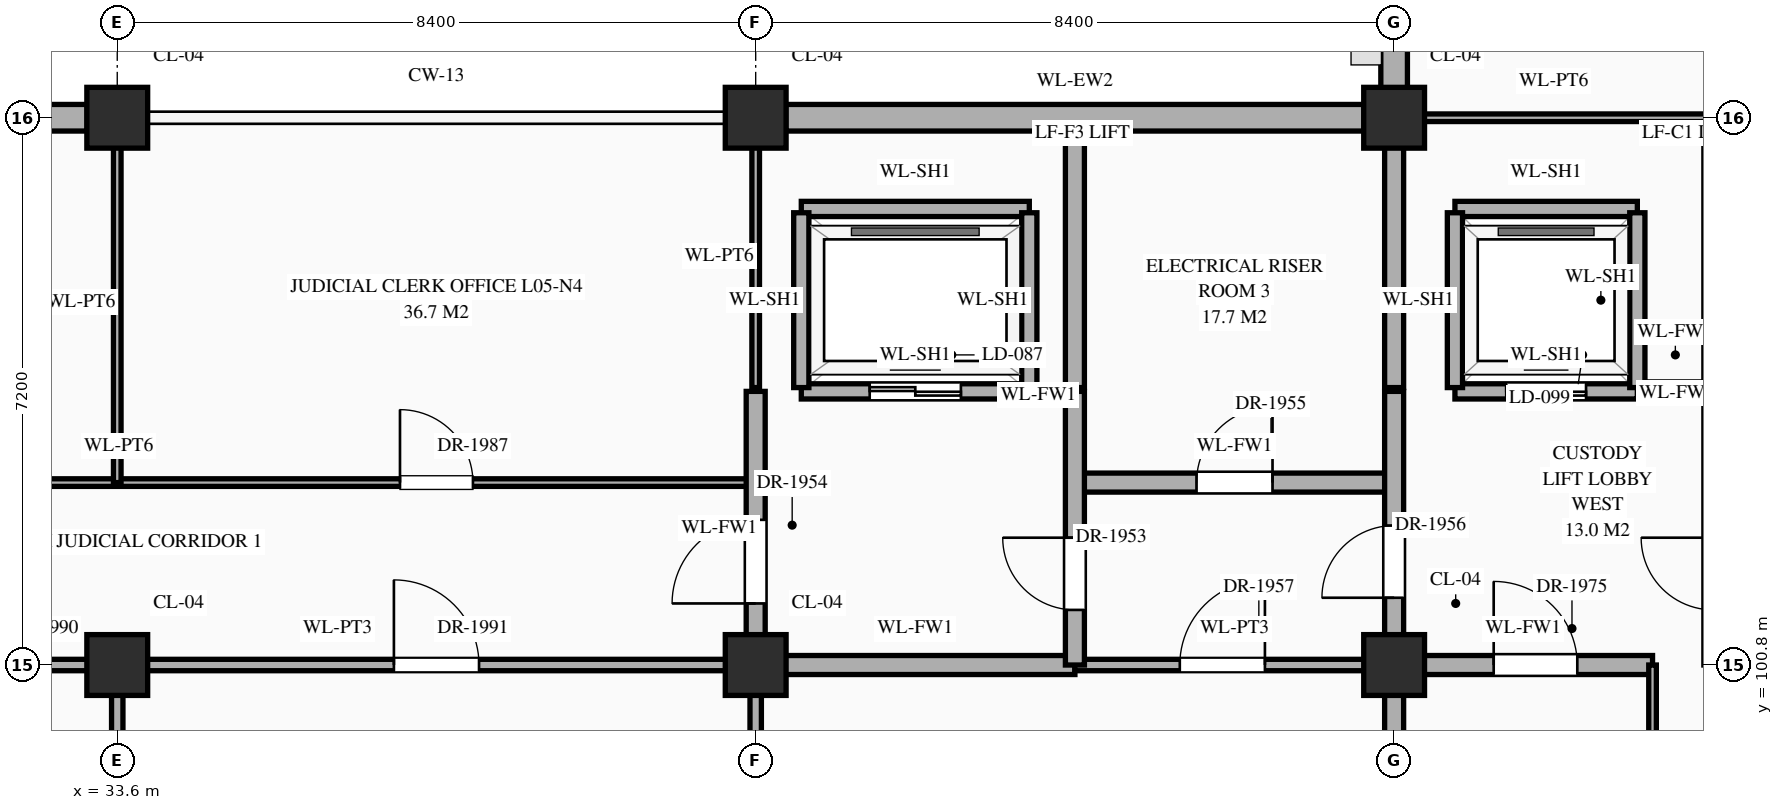
"""IFC4 building model, lengths in metres.
Left out: names, types, materials, properties, quantities, classifications, styles, units other than length and angle.
Written with IfcOpenShell. Run it as: python <this file> out.ifc"""

import sys

from ifc_helpers import new_model, si_unit, direction, frame, frame_2d, origin, origin_2d, place, context, subcontext, project, spatial, rectangle, extrude, element, fill, save


model = new_model("IFC4")
c1 = context("Model", 3, precision=1e-05, world=origin(), true_north=direction((0.0, 1.0)))
c2 = subcontext(c1, "Body", "Model", "MODEL_VIEW")
j1 = project(units=[si_unit("LENGTHUNIT", "METRE"), si_unit("PLANEANGLEUNIT", "RADIAN")], contexts=[c1])
p1 = place(None, origin())
s1 = spatial("IfcSite", under=j1, at=p1, CompositionType="ELEMENT")
p2 = place(p1, origin())
s2 = spatial("IfcBuilding", under=s1, at=p2, CompositionType="ELEMENT")
p3 = place(p2, frame((0.0, 0.0, 21.6)))
s3 = spatial("IfcBuildingStorey", under=s2, at=p3, CompositionType="ELEMENT", Elevation=21.6)
for number, where, z_axis, x_axis in (
    (1, (33.6, 100.8, 0.0), (0.0, 0.0, 1.0), (1.0, 0.0, 0.0)),
    (2, (33.6, 108.0, 0.0), (0.0, 0.0, 1.0), (1.0, 0.0, 0.0)),
    (3, (42.0, 100.8, 0.0), (0.0, 0.0, 1.0), (1.0, 0.0, 0.0)),
    (4, (42.0, 108.0, 0.0), (0.0, 0.0, 1.0), (1.0, 0.0, 0.0)),
    (5, (50.4, 100.8, 0.0), (0.0, 0.0, 1.0), (1.0, 0.0, 0.0)),
    (6, (50.4, 108.0, 0.0), (0.0, 0.0, 1.0), (1.0, 0.0, 0.0)),
):
    element("IfcColumn", number, at=place(p3, frame(where, z_axis=z_axis, x_axis=x_axis)), inside=s3, PredefinedType="COLUMN", context=c2, shape_type="SweptSolid", body=[
        extrude(rectangle(XDim=0.8, YDim=0.8, at=origin_2d()), origin(), (0.0, 0.0, 1.0), 4.5),
    ])
p4 = place(p3, frame((25.595, 108.0, 0.0), z_axis=(0.0, 0.0, 1.0), x_axis=(1.0, 0.0, 0.0)))
e7 = element("IfcWall", 7, at=p4, inside=s3, PredefinedType="STANDARD", context=c2, shape_type="SweptSolid", body=[
    extrude(rectangle(XDim=7.61, YDim=0.35, at=frame_2d((3.805, 0.0))), origin(), (0.0, 0.0, 1.0), 3.59),
])
p5 = place(p4, frame((5.205, 0.0, 0.85)))
e8 = element("IfcOpeningElement", 8, at=p5, cuts=e7, PredefinedType="OPENING", context=c2, shape_type="SweptSolid", body=[
    extrude(rectangle(XDim=1.2, YDim=1.92, at=frame_2d((0.6, 0.96))), frame((0.0, 0.187, 0.0), z_axis=(0.0, -1.0, 0.0), x_axis=(1.0, 0.0, 0.0)), (0.0, 0.0, 1.0), 0.374),
])
p6 = place(p3, frame((42.395, 108.0, 0.0), z_axis=(0.0, 0.0, 1.0), x_axis=(1.0, 0.0, 0.0)))
e9 = element("IfcWall", 9, at=p6, inside=s3, PredefinedType="STANDARD", context=c2, shape_type="SweptSolid", body=[
    extrude(rectangle(XDim=7.61, YDim=0.35, at=frame_2d((3.805, 0.0))), origin(), (0.0, 0.0, 1.0), 3.59),
])
p7 = place(p3, frame((50.4, 108.395, 0.0), z_axis=(0.0, 0.0, 1.0), x_axis=(0.0, 1.0, 0.0)))
e10 = element("IfcWall", 10, at=p7, inside=s3, PredefinedType="STANDARD", context=c2, shape_type="SweptSolid", body=[
    extrude(rectangle(XDim=6.41, YDim=0.35, at=frame_2d((3.205, 0.0))), origin(), (0.0, 0.0, 1.0), 3.59),
])
p8 = place(p7, frame((3.83, 0.0, 0.85)))
e11 = element("IfcOpeningElement", 11, at=p8, cuts=e10, PredefinedType="OPENING", context=c2, shape_type="SweptSolid", body=[
    extrude(rectangle(XDim=1.35, YDim=1.56, at=frame_2d((0.675, 0.78))), frame((0.0, 0.187, 0.0), z_axis=(0.0, -1.0, 0.0), x_axis=(1.0, 0.0, 0.0)), (0.0, 0.0, 1.0), 0.374),
])
p9 = place(p3, frame((31.0, 100.8, 0.0), z_axis=(0.0, 0.0, 1.0), x_axis=(1.0, 0.0, 0.0)))
e12 = element("IfcWall", 12, at=p9, inside=s3, PredefinedType="STANDARD", context=c2, shape_type="SweptSolid", body=[
    extrude(rectangle(XDim=11.0, YDim=0.15, at=frame_2d((5.5, 0.0))), origin(), (0.0, 0.0, 1.0), 3.39),
])
p10 = place(p9, frame((0.6, 0.0, 0.0)))
e13 = element("IfcOpeningElement", 13, at=p10, cuts=e12, PredefinedType="OPENING", context=c2, shape_type="SweptSolid", body=[
    extrude(rectangle(XDim=1.08, YDim=2.25, at=frame_2d((0.54, 1.125))), frame((0.0, 0.087, 0.0), z_axis=(0.0, -1.0, 0.0), x_axis=(1.0, 0.0, 0.0)), (0.0, 0.0, 1.0), 0.174),
])
p11 = place(p9, frame((6.24, 0.0, 0.0)))
e14 = element("IfcOpeningElement", 14, at=p11, cuts=e12, PredefinedType="OPENING", context=c2, shape_type="SweptSolid", body=[
    extrude(rectangle(XDim=1.12, YDim=2.25, at=frame_2d((0.56, 1.125))), frame((0.0, 0.087, 0.0), z_axis=(0.0, -1.0, 0.0), x_axis=(1.0, 0.0, 0.0)), (0.0, 0.0, 1.0), 0.174),
])
p12 = place(p3, frame((42.0, 100.8, 0.0), z_axis=(0.0, 0.0, 1.0), x_axis=(1.0, 0.0, 0.0)))
e15 = element("IfcWall", 15, at=p12, inside=s3, PredefinedType="STANDARD", context=c2, shape_type="SweptSolid", body=[
    extrude(rectangle(XDim=4.2, YDim=0.25, at=frame_2d((2.1, 0.0))), origin(), (0.0, 0.0, 1.0), 3.39),
])
p13 = place(p3, frame((46.2, 100.8, 0.0), z_axis=(0.0, 0.0, 1.0), x_axis=(1.0, 0.0, 0.0)))
e16 = element("IfcWall", 16, at=p13, inside=s3, PredefinedType="STANDARD", context=c2, shape_type="SweptSolid", body=[
    extrude(rectangle(XDim=4.2, YDim=0.15, at=frame_2d((2.1, 0.0))), origin(), (0.0, 0.0, 1.0), 3.39),
])
p14 = place(p13, frame((1.38, 0.0, 0.0)))
e17 = element("IfcOpeningElement", 17, at=p14, cuts=e16, PredefinedType="OPENING", context=c2, shape_type="SweptSolid", body=[
    extrude(rectangle(XDim=1.12, YDim=2.25, at=frame_2d((0.56, 1.125))), frame((0.0, 0.087, 0.0), z_axis=(0.0, -1.0, 0.0), x_axis=(1.0, 0.0, 0.0)), (0.0, 0.0, 1.0), 0.174),
])
p15 = place(p3, frame((50.4, 100.8, 0.0), z_axis=(0.0, 0.0, 1.0), x_axis=(1.0, 0.0, 0.0)))
e18 = element("IfcWall", 18, at=p15, inside=s3, PredefinedType="STANDARD", context=c2, shape_type="SweptSolid", body=[
    extrude(rectangle(XDim=3.4, YDim=0.25, at=frame_2d((1.7, 0.0))), origin(), (0.0, 0.0, 1.0), 3.39),
])
p16 = place(p15, frame((1.31, 0.0, 0.0)))
e19 = element("IfcOpeningElement", 19, at=p16, cuts=e18, PredefinedType="OPENING", context=c2, shape_type="SweptSolid", body=[
    extrude(rectangle(XDim=1.1, YDim=2.2, at=frame_2d((0.55, 1.1))), frame((0.0, 0.137, 0.0), z_axis=(0.0, -1.0, 0.0), x_axis=(1.0, 0.0, 0.0)), (0.0, 0.0, 1.0), 0.274),
])
p17 = place(p3, frame((25.24, 103.2, 0.0), z_axis=(0.0, 0.0, 1.0), x_axis=(1.0, 0.0, 0.0)))
e20 = element("IfcWall", 20, at=p17, inside=s3, PredefinedType="STANDARD", context=c2, shape_type="SweptSolid", body=[
    extrude(rectangle(XDim=16.76, YDim=0.1, at=frame_2d((8.38, 0.0))), origin(), (0.0, 0.0, 1.0), 4.24),
])
p18 = place(p17, frame((3.72, 0.0, 0.0)))
e21 = element("IfcOpeningElement", 21, at=p18, cuts=e20, PredefinedType="OPENING", context=c2, shape_type="SweptSolid", body=[
    extrude(rectangle(XDim=0.92, YDim=2.15, at=frame_2d((0.46, 1.075))), frame((0.0, 0.062, 0.0), z_axis=(0.0, -1.0, 0.0), x_axis=(1.0, 0.0, 0.0)), (0.0, 0.0, 1.0), 0.124),
])
p19 = place(p17, frame((12.08, 0.0, 0.0)))
e22 = element("IfcOpeningElement", 22, at=p19, cuts=e20, PredefinedType="OPENING", context=c2, shape_type="SweptSolid", body=[
    extrude(rectangle(XDim=0.96, YDim=2.2, at=frame_2d((0.48, 1.1))), frame((0.0, 0.062, 0.0), z_axis=(0.0, -1.0, 0.0), x_axis=(1.0, 0.0, 0.0)), (0.0, 0.0, 1.0), 0.124),
])
p20 = place(p3, frame((46.2, 103.2, 0.0), z_axis=(0.0, 0.0, 1.0), x_axis=(1.0, 0.0, 0.0)))
e23 = element("IfcWall", 23, at=p20, inside=s3, PredefinedType="STANDARD", context=c2, shape_type="SweptSolid", body=[
    extrude(rectangle(XDim=4.2, YDim=0.25, at=frame_2d((2.1, 0.0))), origin(), (0.0, 0.0, 1.0), 4.24),
])
p21 = place(p20, frame((1.6, 0.0, 0.0)))
e24 = element("IfcOpeningElement", 24, at=p21, cuts=e23, PredefinedType="OPENING", context=c2, shape_type="SweptSolid", body=[
    extrude(rectangle(XDim=1.0, YDim=2.2, at=frame_2d((0.5, 1.1))), frame((0.0, 0.137, 0.0), z_axis=(0.0, -1.0, 0.0), x_axis=(1.0, 0.0, 0.0)), (0.0, 0.0, 1.0), 0.274),
])
p22 = place(p3, frame((42.6, 104.4, 0.0), z_axis=(0.0, 0.0, 1.0), x_axis=(1.0, 0.0, 0.0)))
e25 = element("IfcWall", 25, at=p22, inside=s3, PredefinedType="STANDARD", context=c2, shape_type="SweptSolid", body=[
    extrude(rectangle(XDim=3.0, YDim=0.2, at=frame_2d((1.5, 0.0))), origin(), (0.0, 0.0, 1.0), 4.24),
])
p23 = place(p22, frame((0.9, 0.0, 0.0)))
e26 = element("IfcOpeningElement", 26, at=p23, cuts=e25, PredefinedType="OPENING", context=c2, shape_type="SweptSolid", body=[
    extrude(rectangle(XDim=1.2, YDim=2.15, at=frame_2d((0.6, 1.075))), frame((0.0, 0.112, 0.0), z_axis=(0.0, -1.0, 0.0), x_axis=(1.0, 0.0, 0.0)), (0.0, 0.0, 1.0), 0.224),
])
p24 = place(p3, frame((51.2, 104.4, 0.0), z_axis=(0.0, 0.0, 1.0), x_axis=(1.0, 0.0, 0.0)))
e27 = element("IfcWall", 27, at=p24, inside=s3, PredefinedType="STANDARD", context=c2, shape_type="SweptSolid", body=[
    extrude(rectangle(XDim=2.4, YDim=0.2, at=frame_2d((1.2, 0.0))), origin(), (0.0, 0.0, 1.0), 4.24),
])
p25 = place(p24, frame((0.675, 0.0, 0.0)))
e28 = element("IfcOpeningElement", 28, at=p25, cuts=e27, PredefinedType="OPENING", context=c2, shape_type="SweptSolid", body=[
    extrude(rectangle(XDim=1.05, YDim=2.15, at=frame_2d((0.525, 1.075))), frame((0.0, 0.112, 0.0), z_axis=(0.0, -1.0, 0.0), x_axis=(1.0, 0.0, 0.0)), (0.0, 0.0, 1.0), 0.224),
])
p26 = place(p3, frame((53.65, 104.4, 0.0), z_axis=(0.0, 0.0, 1.0), x_axis=(1.0, 0.0, 0.0)))
e29 = element("IfcWall", 29, at=p26, inside=s3, PredefinedType="STANDARD", context=c2, shape_type="SweptSolid", body=[
    extrude(rectangle(XDim=0.9, YDim=0.25, at=frame_2d((0.45, 0.0))), origin(), (0.0, 0.0, 1.0), 4.24),
])
p27 = place(p3, frame((42.6, 106.8, 0.0), z_axis=(0.0, 0.0, 1.0), x_axis=(1.0, 0.0, 0.0)))
e30 = element("IfcWall", 30, at=p27, inside=s3, PredefinedType="STANDARD", context=c2, shape_type="SweptSolid", body=[
    extrude(rectangle(XDim=3.0, YDim=0.2, at=frame_2d((1.5, 0.0))), origin(), (0.0, 0.0, 1.0), 4.24),
])
p28 = place(p3, frame((51.2, 106.8, 0.0), z_axis=(0.0, 0.0, 1.0), x_axis=(1.0, 0.0, 0.0)))
e31 = element("IfcWall", 31, at=p28, inside=s3, PredefinedType="STANDARD", context=c2, shape_type="SweptSolid", body=[
    extrude(rectangle(XDim=2.4, YDim=0.2, at=frame_2d((1.2, 0.0))), origin(), (0.0, 0.0, 1.0), 4.24),
])
p29 = place(p3, frame((50.45, 108.0, 0.0), z_axis=(0.0, 0.0, 1.0), x_axis=(1.0, 0.0, 0.0)))
e32 = element("IfcWall", 32, at=p29, inside=s3, PredefinedType="STANDARD", context=c2, shape_type="SweptSolid", body=[
    extrude(rectangle(XDim=4.1, YDim=0.1, at=frame_2d((2.05, 0.0))), origin(), (0.0, 0.0, 1.0), 3.39),
])
p30 = place(p3, frame((33.6, 96.0, 0.0), z_axis=(0.0, 0.0, 1.0), x_axis=(0.0, 1.0, 0.0)))
e33 = element("IfcWall", 33, at=p30, inside=s3, PredefinedType="STANDARD", context=c2, shape_type="SweptSolid", body=[
    extrude(rectangle(XDim=4.8, YDim=0.15, at=frame_2d((2.4, 0.0))), origin(), (0.0, 0.0, 1.0), 4.24),
])
p31 = place(p3, frame((33.6, 103.2, 0.0), z_axis=(0.0, 0.0, 1.0), x_axis=(0.0, 1.0, 0.0)))
e34 = element("IfcWall", 34, at=p31, inside=s3, PredefinedType="STANDARD", context=c2, shape_type="SweptSolid", body=[
    extrude(rectangle(XDim=4.76, YDim=0.1, at=frame_2d((2.38, 0.0))), origin(), (0.0, 0.0, 1.0), 3.49),
])
p32 = place(p3, frame((42.0, 96.0, 0.0), z_axis=(0.0, 0.0, 1.0), x_axis=(0.0, 1.0, 0.0)))
e35 = element("IfcWall", 35, at=p32, inside=s3, PredefinedType="STANDARD", context=c2, shape_type="SweptSolid", body=[
    extrude(rectangle(XDim=4.8, YDim=0.15, at=frame_2d((2.4, 0.0))), origin(), (0.0, 0.0, 1.0), 3.49),
])
p33 = place(p3, frame((42.0, 100.8, 0.0), z_axis=(0.0, 0.0, 1.0), x_axis=(0.0, 1.0, 0.0)))
e36 = element("IfcWall", 36, at=p33, inside=s3, PredefinedType="STANDARD", context=c2, shape_type="SweptSolid", body=[
    extrude(rectangle(XDim=3.6, YDim=0.25, at=frame_2d((1.8, 0.0))), origin(), (0.0, 0.0, 1.0), 3.49),
])
p34 = place(p33, frame((0.81, 0.0, 0.0)))
e37 = element("IfcOpeningElement", 37, at=p34, cuts=e36, PredefinedType="OPENING", context=c2, shape_type="SweptSolid", body=[
    extrude(rectangle(XDim=1.1, YDim=2.2, at=frame_2d((0.55, 1.1))), frame((0.0, 0.137, 0.0), z_axis=(0.0, -1.0, 0.0), x_axis=(1.0, 0.0, 0.0)), (0.0, 0.0, 1.0), 0.274),
])
p35 = place(p3, frame((42.0, 104.45, 0.0), z_axis=(0.0, 0.0, 1.0), x_axis=(0.0, 1.0, 0.0)))
e38 = element("IfcWall", 38, at=p35, inside=s3, PredefinedType="STANDARD", context=c2, shape_type="SweptSolid", body=[
    extrude(rectangle(XDim=3.46, YDim=0.1, at=frame_2d((1.73, 0.0))), origin(), (0.0, 0.0, 1.0), 3.49),
])
for number, where, z_axis, x_axis in (
    (39, (42.6, 104.45, 0.0), (0.0, 0.0, 1.0), (0.0, 1.0, 0.0)),
    (40, (45.6, 104.45, 0.0), (0.0, 0.0, 1.0), (0.0, 1.0, 0.0)),
):
    element("IfcWall", number, at=place(p3, frame(where, z_axis=z_axis, x_axis=x_axis)), inside=s3, PredefinedType="STANDARD", context=c2, shape_type="SweptSolid", body=[
        extrude(rectangle(XDim=2.3, YDim=0.2, at=frame_2d((1.15, 0.0))), origin(), (0.0, 0.0, 1.0), 4.24),
    ])
p36 = place(p3, frame((46.2, 100.8, 0.0), z_axis=(0.0, 0.0, 1.0), x_axis=(0.0, 1.0, 0.0)))
e41 = element("IfcWall", 41, at=p36, inside=s3, PredefinedType="STANDARD", context=c2, shape_type="SweptSolid", body=[
    extrude(rectangle(XDim=3.6, YDim=0.25, at=frame_2d((1.8, 0.0))), origin(), (0.0, 0.0, 1.0), 3.89),
])
p37 = place(p36, frame((0.725, 0.0, 0.0)))
e42 = element("IfcOpeningElement", 42, at=p37, cuts=e41, PredefinedType="OPENING", context=c2, shape_type="SweptSolid", body=[
    extrude(rectangle(XDim=0.95, YDim=2.15, at=frame_2d((0.475, 1.075))), frame((0.0, 0.137, 0.0), z_axis=(0.0, -1.0, 0.0), x_axis=(1.0, 0.0, 0.0)), (0.0, 0.0, 1.0), 0.274),
])
p38 = place(p3, frame((46.2, 104.45, 0.0), z_axis=(0.0, 0.0, 1.0), x_axis=(0.0, 1.0, 0.0)))
e43 = element("IfcWall", 43, at=p38, inside=s3, PredefinedType="STANDARD", context=c2, shape_type="SweptSolid", body=[
    extrude(rectangle(XDim=3.46, YDim=0.25, at=frame_2d((1.73, 0.0))), origin(), (0.0, 0.0, 1.0), 3.89),
])
p39 = place(p3, frame((50.4, 91.2, 0.0), z_axis=(0.0, 0.0, 1.0), x_axis=(0.0, 1.0, 0.0)))
e44 = element("IfcWall", 44, at=p39, inside=s3, PredefinedType="STANDARD", context=c2, shape_type="SweptSolid", body=[
    extrude(rectangle(XDim=13.2, YDim=0.25, at=frame_2d((6.6, 0.0))), origin(), (0.0, 0.0, 1.0), 3.49),
])
p40 = place(p39, frame((0.49, 0.0, 0.0)))
e45 = element("IfcOpeningElement", 45, at=p40, cuts=e44, PredefinedType="OPENING", context=c2, shape_type="SweptSolid", body=[
    extrude(rectangle(XDim=1.1, YDim=2.2, at=frame_2d((0.55, 1.1))), frame((0.0, 0.137, 0.0), z_axis=(0.0, -1.0, 0.0), x_axis=(1.0, 0.0, 0.0)), (0.0, 0.0, 1.0), 0.274),
])
p41 = place(p39, frame((10.485, 0.0, 0.0)))
e46 = element("IfcOpeningElement", 46, at=p41, cuts=e44, PredefinedType="OPENING", context=c2, shape_type="SweptSolid", body=[
    extrude(rectangle(XDim=0.95, YDim=2.15, at=frame_2d((0.475, 1.075))), frame((0.0, 0.137, 0.0), z_axis=(0.0, -1.0, 0.0), x_axis=(1.0, 0.0, 0.0)), (0.0, 0.0, 1.0), 0.274),
])
p42 = place(p39, frame((3.26, 0.0, 0.0)))
e47 = element("IfcOpeningElement", 47, at=p42, cuts=e44, PredefinedType="OPENING", context=c2, shape_type="SweptSolid", body=[
    extrude(rectangle(XDim=1.0, YDim=2.2, at=frame_2d((0.5, 1.1))), frame((0.0, 0.137, 0.0), z_axis=(0.0, -1.0, 0.0), x_axis=(1.0, 0.0, 0.0)), (0.0, 0.0, 1.0), 0.274),
])
p43 = place(p3, frame((50.4, 104.45, 0.0), z_axis=(0.0, 0.0, 1.0), x_axis=(0.0, 1.0, 0.0)))
e48 = element("IfcWall", 48, at=p43, inside=s3, PredefinedType="STANDARD", context=c2, shape_type="SweptSolid", body=[
    extrude(rectangle(XDim=3.46, YDim=0.25, at=frame_2d((1.73, 0.0))), origin(), (0.0, 0.0, 1.0), 3.49),
])
for number, where, z_axis, x_axis in (
    (49, (51.2, 104.45, 0.0), (0.0, 0.0, 1.0), (0.0, 1.0, 0.0)),
    (50, (53.6, 104.45, 0.0), (0.0, 0.0, 1.0), (0.0, 1.0, 0.0)),
):
    element("IfcWall", number, at=place(p3, frame(where, z_axis=z_axis, x_axis=x_axis)), inside=s3, PredefinedType="STANDARD", context=c2, shape_type="SweptSolid", body=[
        extrude(rectangle(XDim=2.3, YDim=0.2, at=frame_2d((1.15, 0.0))), origin(), (0.0, 0.0, 1.0), 4.24),
    ])
p44 = place(p3, frame((53.8, 96.0, 0.0), z_axis=(0.0, 0.0, 1.0), x_axis=(0.0, 1.0, 0.0)))
e51 = element("IfcWall", 51, at=p44, inside=s3, PredefinedType="STANDARD", context=c2, shape_type="SweptSolid", body=[
    extrude(rectangle(XDim=4.8, YDim=0.1, at=frame_2d((2.4, 0.0))), origin(), (0.0, 0.0, 1.0), 4.24),
])
p45 = place(p44, frame((1.89, 0.0, 0.0)))
e52 = element("IfcOpeningElement", 52, at=p45, cuts=e51, PredefinedType="OPENING", context=c2, shape_type="SweptSolid", body=[
    extrude(rectangle(XDim=1.02, YDim=2.4, at=frame_2d((0.51, 1.2))), frame((0.0, 0.062, 0.0), z_axis=(0.0, -1.0, 0.0), x_axis=(1.0, 0.0, 0.0)), (0.0, 0.0, 1.0), 0.124),
])
p46 = place(p23, origin())
e53 = element("IfcDoor", 53, at=p46, inside=s3, OperationType="DOUBLE_DOOR_SLIDING", PredefinedType="DOOR", context=c2, shape_type="SweptSolid", body=[
    extrude(rectangle(XDim=1.2, YDim=2.15, at=frame_2d((0.6, 1.075))), frame((0.0, 0.025, 0.0), z_axis=(0.0, -1.0, 0.0), x_axis=(1.0, 0.0, 0.0)), (0.0, 0.0, 1.0), 0.05),
])
fill(e26, e53)
p47 = place(p25, origin())
e54 = element("IfcDoor", 54, at=p47, inside=s3, OperationType="DOUBLE_DOOR_SLIDING", PredefinedType="DOOR", context=c2, shape_type="SweptSolid", body=[
    extrude(rectangle(XDim=1.05, YDim=2.15, at=frame_2d((0.525, 1.075))), frame((0.0, 0.025, 0.0), z_axis=(0.0, -1.0, 0.0), x_axis=(1.0, 0.0, 0.0)), (0.0, 0.0, 1.0), 0.05),
])
fill(e28, e54)
p48 = place(p37, origin())
e55 = element("IfcDoor", 55, at=p48, inside=s3, OperationType="SINGLE_SWING_RIGHT", PredefinedType="DOOR", context=c2, shape_type="SweptSolid", body=[
    extrude(rectangle(XDim=0.95, YDim=2.15, at=frame_2d((0.475, 1.075))), frame((0.0, 0.025, 0.0), z_axis=(0.0, -1.0, 0.0), x_axis=(1.0, 0.0, 0.0)), (0.0, 0.0, 1.0), 0.05),
])
fill(e42, e55)
p49 = place(p34, origin())
e56 = element("IfcDoor", 56, at=p49, inside=s3, OperationType="SINGLE_SWING_LEFT", PredefinedType="DOOR", context=c2, shape_type="SweptSolid", body=[
    extrude(rectangle(XDim=1.1, YDim=2.2, at=frame_2d((0.55, 1.1))), frame((0.0, 0.025, 0.0), z_axis=(0.0, -1.0, 0.0), x_axis=(1.0, 0.0, 0.0)), (0.0, 0.0, 1.0), 0.05),
])
fill(e37, e56)
p50 = place(p21, origin())
e57 = element("IfcDoor", 57, at=p50, inside=s3, OperationType="SINGLE_SWING_RIGHT", PredefinedType="DOOR", context=c2, shape_type="SweptSolid", body=[
    extrude(rectangle(XDim=1.0, YDim=2.2, at=frame_2d((0.5, 1.1))), frame((0.0, 0.025, 0.0), z_axis=(0.0, -1.0, 0.0), x_axis=(1.0, 0.0, 0.0)), (0.0, 0.0, 1.0), 0.05),
])
fill(e24, e57)
p51 = place(p41, origin())
e58 = element("IfcDoor", 58, at=p51, inside=s3, OperationType="SINGLE_SWING_LEFT", PredefinedType="DOOR", context=c2, shape_type="SweptSolid", body=[
    extrude(rectangle(XDim=0.95, YDim=2.15, at=frame_2d((0.475, 1.075))), frame((0.0, 0.025, 0.0), z_axis=(0.0, -1.0, 0.0), x_axis=(1.0, 0.0, 0.0)), (0.0, 0.0, 1.0), 0.05),
])
fill(e46, e58)
p52 = place(p14, origin())
e59 = element("IfcDoor", 59, at=p52, inside=s3, OperationType="SINGLE_SWING_RIGHT", PredefinedType="DOOR", context=c2, shape_type="SweptSolid", body=[
    extrude(rectangle(XDim=1.12, YDim=2.25, at=frame_2d((0.56, 1.125))), frame((0.0, 0.025, 0.0), z_axis=(0.0, -1.0, 0.0), x_axis=(1.0, 0.0, 0.0)), (0.0, 0.0, 1.0), 0.05),
])
fill(e17, e59)
p53 = place(p16, origin())
e60 = element("IfcDoor", 60, at=p53, inside=s3, OperationType="SINGLE_SWING_LEFT", PredefinedType="DOOR", context=c2, shape_type="SweptSolid", body=[
    extrude(rectangle(XDim=1.1, YDim=2.2, at=frame_2d((0.55, 1.1))), frame((0.0, 0.025, 0.0), z_axis=(0.0, -1.0, 0.0), x_axis=(1.0, 0.0, 0.0)), (0.0, 0.0, 1.0), 0.05),
])
fill(e19, e60)
p54 = place(p19, origin())
e61 = element("IfcDoor", 61, at=p54, inside=s3, OperationType="SINGLE_SWING_LEFT", PredefinedType="DOOR", context=c2, shape_type="SweptSolid", body=[
    extrude(rectangle(XDim=0.96, YDim=2.2, at=frame_2d((0.48, 1.1))), frame((0.0, 0.025, 0.0), z_axis=(0.0, -1.0, 0.0), x_axis=(1.0, 0.0, 0.0)), (0.0, 0.0, 1.0), 0.05),
])
fill(e22, e61)
p55 = place(p11, origin())
e62 = element("IfcDoor", 62, at=p55, inside=s3, OperationType="SINGLE_SWING_LEFT", PredefinedType="DOOR", context=c2, shape_type="SweptSolid", body=[
    extrude(rectangle(XDim=1.12, YDim=2.25, at=frame_2d((0.56, 1.125))), frame((0.0, 0.025, 0.0), z_axis=(0.0, -1.0, 0.0), x_axis=(1.0, 0.0, 0.0)), (0.0, 0.0, 1.0), 0.05),
])
fill(e14, e62)
save(model, sys.argv[1])
